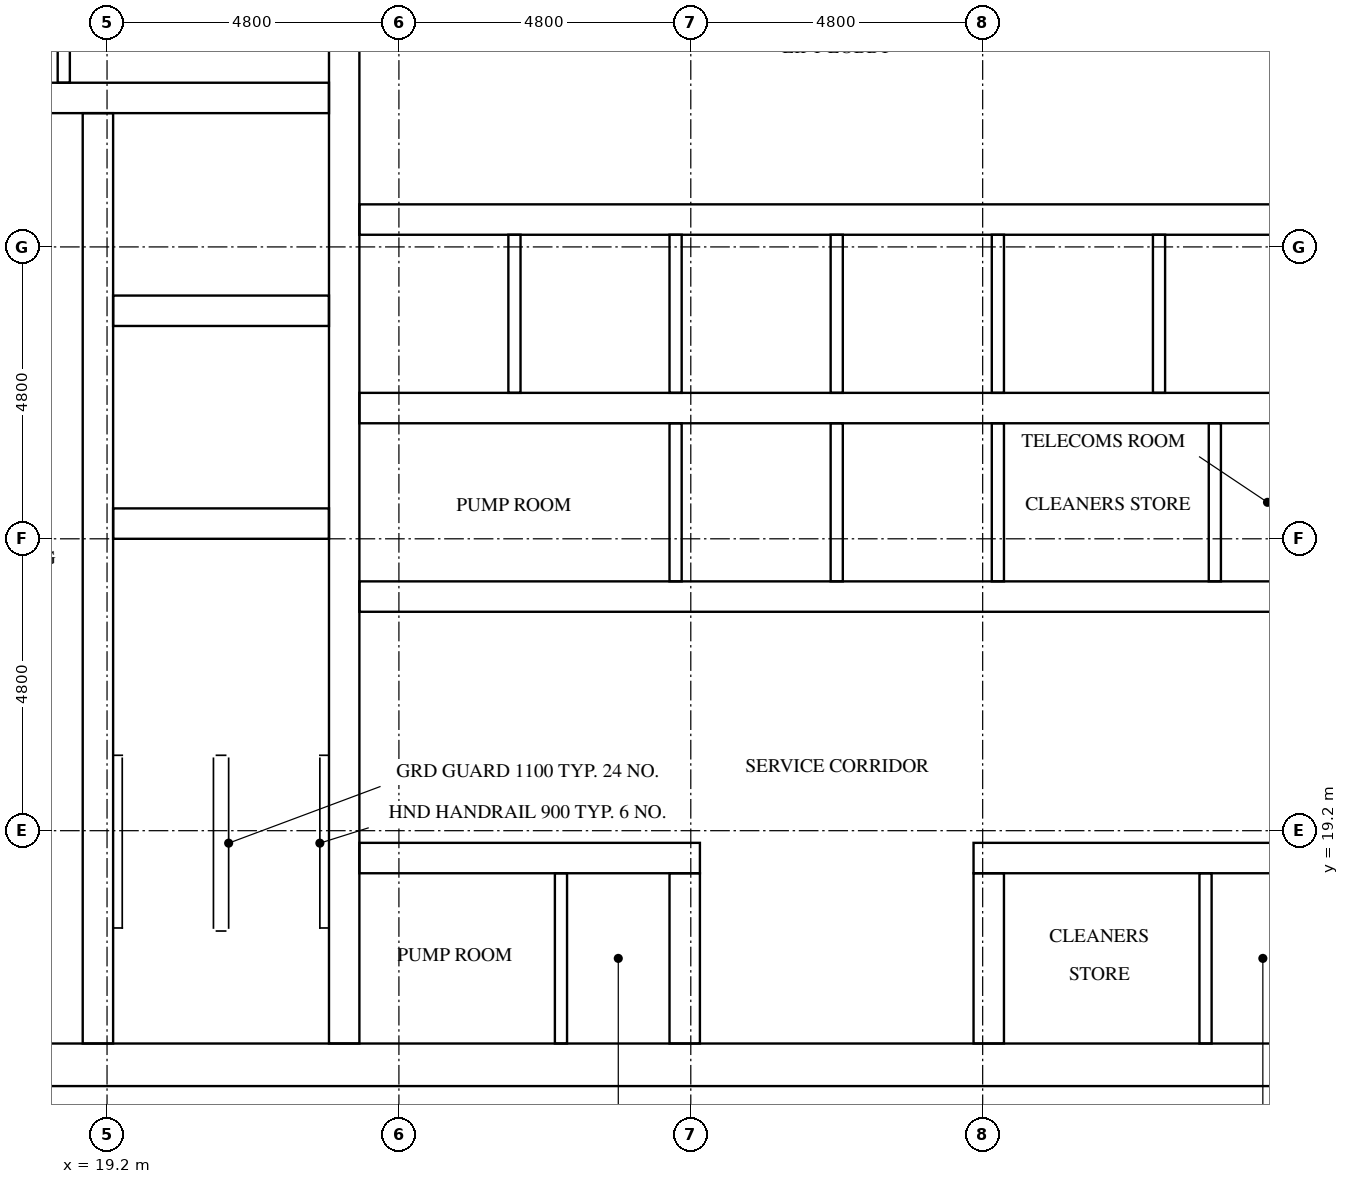
"""IFC4 building model, lengths in metres.
Left out: names, types, materials, properties, quantities, classifications, styles, units other than length and angle.
Written with IfcOpenShell. Run it as: python <this file> out.ifc"""

import sys

from ifc_helpers import new_model, si_unit, direction, frame, frame_2d, origin, place, context, subcontext, project, spatial, rectangle, extrude, element, fill, save


model = new_model("IFC4")
c1 = context("Model", 3, precision=1e-05, world=origin(), true_north=direction((0.0, 1.0)))
c2 = subcontext(c1, "Body", "Model", "MODEL_VIEW")
j1 = project(units=[si_unit("LENGTHUNIT", "METRE"), si_unit("PLANEANGLEUNIT", "RADIAN")], contexts=[c1])
p1 = place(None, origin())
s1 = spatial("IfcSite", under=j1, at=p1, CompositionType="ELEMENT")
p2 = place(p1, origin())
s2 = spatial("IfcBuilding", under=s1, at=p2, CompositionType="ELEMENT")
p3 = place(p2, frame((0.0, 0.0, 226.3)))
s3 = spatial("IfcBuildingStorey", under=s2, at=p3, CompositionType="ELEMENT", Elevation=226.3)
p4 = place(p3, frame((15.0, 15.35, 0.0), z_axis=(0.0, 0.0, 1.0), x_axis=(1.0, 0.0, 0.0)))
e1 = element("IfcWall", 1, at=p4, inside=s3, PredefinedType="SHEAR", context=c2, shape_type="SweptSolid", body=[
    extrude(rectangle(XDim=32.4, YDim=0.7, at=frame_2d((16.2, 0.0))), origin(), (0.0, 0.0, 1.0), 3.2),
])
p5 = place(p4, frame((15.3, 0.0, 0.0)))
e2 = element("IfcOpeningElement", 2, at=p5, cuts=e1, PredefinedType="OPENING", context=c2, shape_type="SweptSolid", body=[
    extrude(rectangle(XDim=1.8, YDim=2.1, at=frame_2d((0.9, 1.05))), frame((0.0, 0.36, 0.0), z_axis=(0.0, -1.0, 0.0), x_axis=(1.0, 0.0, 0.0)), (0.0, 0.0, 1.0), 0.72),
])
p6 = place(p3, frame((19.05, 15.7, 0.0), z_axis=(0.0, 0.0, 1.0), x_axis=(0.0, 1.0, 0.0)))
e3 = element("IfcWall", 3, at=p6, inside=s3, PredefinedType="SHEAR", context=c2, shape_type="SweptSolid", body=[
    extrude(rectangle(XDim=15.3, YDim=0.5, at=frame_2d((7.65, 0.0))), origin(), (0.0, 0.0, 1.0), 3.2),
])
p7 = place(p6, frame((9.75, 0.0, 0.0)))
e4 = element("IfcOpeningElement", 4, at=p7, cuts=e3, PredefinedType="OPENING", context=c2, shape_type="SweptSolid", body=[
    extrude(rectangle(XDim=1.1, YDim=2.1, at=frame_2d((0.55, 1.05))), frame((0.0, 0.26, 0.0), z_axis=(0.0, -1.0, 0.0), x_axis=(1.0, 0.0, 0.0)), (0.0, 0.0, 1.0), 0.52),
])
p8 = place(p6, frame((13.25, 0.0, 0.0)))
e5 = element("IfcOpeningElement", 5, at=p8, cuts=e3, PredefinedType="OPENING", context=c2, shape_type="SweptSolid", body=[
    extrude(rectangle(XDim=1.1, YDim=2.1, at=frame_2d((0.55, 1.05))), frame((0.0, 0.26, 0.0), z_axis=(0.0, -1.0, 0.0), x_axis=(1.0, 0.0, 0.0)), (0.0, 0.0, 1.0), 0.52),
])
p9 = place(p6, frame((0.5, 0.0, 0.0)))
e6 = element("IfcOpeningElement", 6, at=p9, cuts=e3, PredefinedType="OPENING", context=c2, shape_type="SweptSolid", body=[
    extrude(rectangle(XDim=1.2, YDim=2.1, at=frame_2d((0.6, 1.05))), frame((0.0, 0.26, 0.0), z_axis=(0.0, -1.0, 0.0), x_axis=(1.0, 0.0, 0.0)), (0.0, 0.0, 1.0), 0.52),
])
p10 = place(p3, frame((23.1, 15.7, 0.0), z_axis=(0.0, 0.0, 1.0), x_axis=(0.0, 1.0, 0.0)))
e7 = element("IfcWall", 7, at=p10, inside=s3, PredefinedType="SHEAR", context=c2, shape_type="SweptSolid", body=[
    extrude(rectangle(XDim=21.4, YDim=0.5, at=frame_2d((10.7, 0.0))), origin(), (0.0, 0.0, 1.0), 3.2),
])
for number, where, z_axis, x_axis in (
    (8, (19.3, 24.25, 0.0), (0.0, 0.0, 1.0), (1.0, 0.0, 0.0)),
    (9, (19.3, 27.75, 0.0), (0.0, 0.0, 1.0), (1.0, 0.0, 0.0)),
):
    element("IfcWall", number, at=place(p3, frame(where, z_axis=z_axis, x_axis=x_axis)), inside=s3, PredefinedType="SHEAR", context=c2, shape_type="SweptSolid", body=[
        extrude(rectangle(XDim=3.55, YDim=0.5, at=frame_2d((1.775, 0.0))), origin(), (0.0, 0.0, 1.0), 3.2),
    ])
p11 = place(p3, frame((15.7, 31.25, 0.0), z_axis=(0.0, 0.0, 1.0), x_axis=(1.0, 0.0, 0.0)))
e10 = element("IfcWall", 10, at=p11, inside=s3, PredefinedType="SHEAR", context=c2, shape_type="SweptSolid", body=[
    extrude(rectangle(XDim=7.15, YDim=0.5, at=frame_2d((3.575, 0.0))), origin(), (0.0, 0.0, 1.0), 3.2),
])
p12 = place(p3, frame((23.35, 18.75, 0.0), z_axis=(0.0, 0.0, 1.0), x_axis=(1.0, 0.0, 0.0)))
e11 = element("IfcWall", 11, at=p12, inside=s3, PredefinedType="SHEAR", context=c2, shape_type="SweptSolid", body=[
    extrude(rectangle(XDim=5.6, YDim=0.5, at=frame_2d((2.8, 0.0))), origin(), (0.0, 0.0, 1.0), 3.2),
])
p13 = place(p12, frame((1.107, 0.0, 0.0)))
e12 = element("IfcOpeningElement", 12, at=p13, cuts=e11, PredefinedType="OPENING", context=c2, shape_type="SweptSolid", body=[
    extrude(rectangle(XDim=1.0, YDim=2.1, at=frame_2d((0.5, 1.05))), frame((0.0, 0.26, 0.0), z_axis=(0.0, -1.0, 0.0), x_axis=(1.0, 0.0, 0.0)), (0.0, 0.0, 1.0), 0.52),
])
p14 = place(p12, frame((3.758, 0.0, 0.0)))
e13 = element("IfcOpeningElement", 13, at=p14, cuts=e11, PredefinedType="OPENING", context=c2, shape_type="SweptSolid", body=[
    extrude(rectangle(XDim=1.0, YDim=2.1, at=frame_2d((0.5, 1.05))), frame((0.0, 0.26, 0.0), z_axis=(0.0, -1.0, 0.0), x_axis=(1.0, 0.0, 0.0)), (0.0, 0.0, 1.0), 0.52),
])
p15 = place(p3, frame((33.45, 18.75, 0.0), z_axis=(0.0, 0.0, 1.0), x_axis=(1.0, 0.0, 0.0)))
e14 = element("IfcWall", 14, at=p15, inside=s3, PredefinedType="SHEAR", context=c2, shape_type="SweptSolid", body=[
    extrude(rectangle(XDim=5.6, YDim=0.5, at=frame_2d((2.8, 0.0))), origin(), (0.0, 0.0, 1.0), 3.2),
])
p16 = place(p15, frame((1.607, 0.0, 0.0)))
e15 = element("IfcOpeningElement", 15, at=p16, cuts=e14, PredefinedType="OPENING", context=c2, shape_type="SweptSolid", body=[
    extrude(rectangle(XDim=1.0, YDim=2.1, at=frame_2d((0.5, 1.05))), frame((0.0, 0.26, 0.0), z_axis=(0.0, -1.0, 0.0), x_axis=(1.0, 0.0, 0.0)), (0.0, 0.0, 1.0), 0.52),
])
p17 = place(p15, frame((4.258, 0.0, 0.0)))
e16 = element("IfcOpeningElement", 16, at=p17, cuts=e14, PredefinedType="OPENING", context=c2, shape_type="SweptSolid", body=[
    extrude(rectangle(XDim=1.0, YDim=2.1, at=frame_2d((0.5, 1.05))), frame((0.0, 0.26, 0.0), z_axis=(0.0, -1.0, 0.0), x_axis=(1.0, 0.0, 0.0)), (0.0, 0.0, 1.0), 0.52),
])
p18 = place(p3, frame((23.35, 23.05, 0.0), z_axis=(0.0, 0.0, 1.0), x_axis=(1.0, 0.0, 0.0)))
e17 = element("IfcWall", 17, at=p18, inside=s3, PredefinedType="SHEAR", context=c2, shape_type="SweptSolid", body=[
    extrude(rectangle(XDim=15.7, YDim=0.5, at=frame_2d((7.85, 0.0))), origin(), (0.0, 0.0, 1.0), 3.2),
])
p19 = place(p18, frame((2.05, 0.0, 0.0)))
e18 = element("IfcOpeningElement", 18, at=p19, cuts=e17, PredefinedType="OPENING", context=c2, shape_type="SweptSolid", body=[
    extrude(rectangle(XDim=1.0, YDim=2.1, at=frame_2d((0.5, 1.05))), frame((0.0, 0.26, 0.0), z_axis=(0.0, -1.0, 0.0), x_axis=(1.0, 0.0, 0.0)), (0.0, 0.0, 1.0), 0.52),
])
p20 = place(p18, frame((11.784, 0.0, 0.0)))
e19 = element("IfcOpeningElement", 19, at=p20, cuts=e17, PredefinedType="OPENING", context=c2, shape_type="SweptSolid", body=[
    extrude(rectangle(XDim=1.0, YDim=2.1, at=frame_2d((0.5, 1.05))), frame((0.0, 0.26, 0.0), z_axis=(0.0, -1.0, 0.0), x_axis=(1.0, 0.0, 0.0)), (0.0, 0.0, 1.0), 0.52),
])
p21 = place(p18, frame((14.434, 0.0, 0.0)))
e20 = element("IfcOpeningElement", 20, at=p21, cuts=e17, PredefinedType="OPENING", context=c2, shape_type="SweptSolid", body=[
    extrude(rectangle(XDim=1.0, YDim=2.1, at=frame_2d((0.5, 1.05))), frame((0.0, 0.26, 0.0), z_axis=(0.0, -1.0, 0.0), x_axis=(1.0, 0.0, 0.0)), (0.0, 0.0, 1.0), 0.52),
])
p22 = place(p3, frame((23.35, 26.15, 0.0), z_axis=(0.0, 0.0, 1.0), x_axis=(1.0, 0.0, 0.0)))
e21 = element("IfcWall", 21, at=p22, inside=s3, PredefinedType="SHEAR", context=c2, shape_type="SweptSolid", body=[
    extrude(rectangle(XDim=15.7, YDim=0.5, at=frame_2d((7.85, 0.0))), origin(), (0.0, 0.0, 1.0), 3.2),
])
p23 = place(p3, frame((23.35, 29.25, 0.0), z_axis=(0.0, 0.0, 1.0), x_axis=(1.0, 0.0, 0.0)))
e22 = element("IfcWall", 22, at=p23, inside=s3, PredefinedType="SHEAR", context=c2, shape_type="SweptSolid", body=[
    extrude(rectangle(XDim=15.7, YDim=0.5, at=frame_2d((7.85, 0.0))), origin(), (0.0, 0.0, 1.0), 3.2),
])
p24 = place(p23, frame((0.675, 0.0, 0.0)))
e23 = element("IfcOpeningElement", 23, at=p24, cuts=e22, PredefinedType="OPENING", context=c2, shape_type="SweptSolid", body=[
    extrude(rectangle(XDim=1.1, YDim=2.1, at=frame_2d((0.55, 1.05))), frame((0.0, 0.26, 0.0), z_axis=(0.0, -1.0, 0.0), x_axis=(1.0, 0.0, 0.0)), (0.0, 0.0, 1.0), 0.52),
])
p25 = place(p23, frame((3.325, 0.0, 0.0)))
e24 = element("IfcOpeningElement", 24, at=p25, cuts=e22, PredefinedType="OPENING", context=c2, shape_type="SweptSolid", body=[
    extrude(rectangle(XDim=1.1, YDim=2.1, at=frame_2d((0.55, 1.05))), frame((0.0, 0.26, 0.0), z_axis=(0.0, -1.0, 0.0), x_axis=(1.0, 0.0, 0.0)), (0.0, 0.0, 1.0), 0.52),
])
p26 = place(p23, frame((5.975, 0.0, 0.0)))
e25 = element("IfcOpeningElement", 25, at=p26, cuts=e22, PredefinedType="OPENING", context=c2, shape_type="SweptSolid", body=[
    extrude(rectangle(XDim=1.1, YDim=2.1, at=frame_2d((0.55, 1.05))), frame((0.0, 0.26, 0.0), z_axis=(0.0, -1.0, 0.0), x_axis=(1.0, 0.0, 0.0)), (0.0, 0.0, 1.0), 0.52),
])
p27 = place(p23, frame((8.625, 0.0, 0.0)))
e26 = element("IfcOpeningElement", 26, at=p27, cuts=e22, PredefinedType="OPENING", context=c2, shape_type="SweptSolid", body=[
    extrude(rectangle(XDim=1.1, YDim=2.1, at=frame_2d((0.55, 1.05))), frame((0.0, 0.26, 0.0), z_axis=(0.0, -1.0, 0.0), x_axis=(1.0, 0.0, 0.0)), (0.0, 0.0, 1.0), 0.52),
])
p28 = place(p23, frame((11.275, 0.0, 0.0)))
e27 = element("IfcOpeningElement", 27, at=p28, cuts=e22, PredefinedType="OPENING", context=c2, shape_type="SweptSolid", body=[
    extrude(rectangle(XDim=1.1, YDim=2.1, at=frame_2d((0.55, 1.05))), frame((0.0, 0.26, 0.0), z_axis=(0.0, -1.0, 0.0), x_axis=(1.0, 0.0, 0.0)), (0.0, 0.0, 1.0), 0.52),
])
p29 = place(p23, frame((13.925, 0.0, 0.0)))
e28 = element("IfcOpeningElement", 28, at=p29, cuts=e22, PredefinedType="OPENING", context=c2, shape_type="SweptSolid", body=[
    extrude(rectangle(XDim=1.1, YDim=2.1, at=frame_2d((0.55, 1.05))), frame((0.0, 0.26, 0.0), z_axis=(0.0, -1.0, 0.0), x_axis=(1.0, 0.0, 0.0)), (0.0, 0.0, 1.0), 0.52),
])
for number, where, z_axis, x_axis in (
    (29, (28.7, 15.7, 0.0), (0.0, 0.0, 1.0), (0.0, 1.0, 0.0)),
    (30, (33.7, 15.7, 0.0), (0.0, 0.0, 1.0), (0.0, 1.0, 0.0)),
):
    element("IfcWall", number, at=place(p3, frame(where, z_axis=z_axis, x_axis=x_axis)), inside=s3, PredefinedType="SHEAR", context=c2, shape_type="SweptSolid", body=[
        extrude(rectangle(XDim=2.8, YDim=0.5, at=frame_2d((1.4, 0.0))), origin(), (0.0, 0.0, 1.0), 3.2),
    ])
p30 = place(p3, frame((25.9, 26.4, 0.0), z_axis=(0.0, 0.0, 1.0), x_axis=(0.0, 1.0, 0.0)))
e31 = element("IfcWall", 31, at=p30, inside=s3, PredefinedType="SOLIDWALL", context=c2, shape_type="SweptSolid", body=[
    extrude(rectangle(XDim=2.6, YDim=0.2, at=frame_2d((1.3, 0.0))), origin(), (0.0, 0.0, 1.0), 3.2),
])
p31 = place(p3, frame((28.55, 23.3, 0.0), z_axis=(0.0, 0.0, 1.0), x_axis=(0.0, 1.0, 0.0)))
e32 = element("IfcWall", 32, at=p31, inside=s3, PredefinedType="SOLIDWALL", context=c2, shape_type="SweptSolid", body=[
    extrude(rectangle(XDim=2.6, YDim=0.2, at=frame_2d((1.3, 0.0))), origin(), (0.0, 0.0, 1.0), 3.2),
])
p32 = place(p3, frame((28.55, 26.4, 0.0), z_axis=(0.0, 0.0, 1.0), x_axis=(0.0, 1.0, 0.0)))
e33 = element("IfcWall", 33, at=p32, inside=s3, PredefinedType="SOLIDWALL", context=c2, shape_type="SweptSolid", body=[
    extrude(rectangle(XDim=2.6, YDim=0.2, at=frame_2d((1.3, 0.0))), origin(), (0.0, 0.0, 1.0), 3.2),
])
p33 = place(p3, frame((31.2, 23.3, 0.0), z_axis=(0.0, 0.0, 1.0), x_axis=(0.0, 1.0, 0.0)))
e34 = element("IfcWall", 34, at=p33, inside=s3, PredefinedType="SOLIDWALL", context=c2, shape_type="SweptSolid", body=[
    extrude(rectangle(XDim=2.6, YDim=0.2, at=frame_2d((1.3, 0.0))), origin(), (0.0, 0.0, 1.0), 3.2),
])
p34 = place(p3, frame((31.2, 26.4, 0.0), z_axis=(0.0, 0.0, 1.0), x_axis=(0.0, 1.0, 0.0)))
e35 = element("IfcWall", 35, at=p34, inside=s3, PredefinedType="SOLIDWALL", context=c2, shape_type="SweptSolid", body=[
    extrude(rectangle(XDim=2.6, YDim=0.2, at=frame_2d((1.3, 0.0))), origin(), (0.0, 0.0, 1.0), 3.2),
])
p35 = place(p3, frame((33.85, 23.3, 0.0), z_axis=(0.0, 0.0, 1.0), x_axis=(0.0, 1.0, 0.0)))
e36 = element("IfcWall", 36, at=p35, inside=s3, PredefinedType="SOLIDWALL", context=c2, shape_type="SweptSolid", body=[
    extrude(rectangle(XDim=2.6, YDim=0.2, at=frame_2d((1.3, 0.0))), origin(), (0.0, 0.0, 1.0), 3.2),
])
for number, where, z_axis, x_axis in (
    (37, (33.85, 26.4, 0.0), (0.0, 0.0, 1.0), (0.0, 1.0, 0.0)),
    (38, (36.5, 26.4, 0.0), (0.0, 0.0, 1.0), (0.0, 1.0, 0.0)),
):
    element("IfcWall", number, at=place(p3, frame(where, z_axis=z_axis, x_axis=x_axis)), inside=s3, PredefinedType="SOLIDWALL", context=c2, shape_type="SweptSolid", body=[
        extrude(rectangle(XDim=2.6, YDim=0.2, at=frame_2d((1.3, 0.0))), origin(), (0.0, 0.0, 1.0), 3.2),
    ])
p36 = place(p3, frame((18.489, 31.5, 0.0), z_axis=(0.0, 0.0, 1.0), x_axis=(0.0, 1.0, 0.0)))
e39 = element("IfcWall", 39, at=p36, inside=s3, PredefinedType="PARTITIONING", context=c2, shape_type="SweptSolid", body=[
    extrude(rectangle(XDim=5.6, YDim=0.2, at=frame_2d((2.8, 0.0))), origin(), (0.0, 0.0, 1.0), 3.2),
])
p37 = place(p3, frame((37.418, 23.3, 0.0), z_axis=(0.0, 0.0, 1.0), x_axis=(0.0, 1.0, 0.0)))
e40 = element("IfcWall", 40, at=p37, inside=s3, PredefinedType="PARTITIONING", context=c2, shape_type="SweptSolid", body=[
    extrude(rectangle(XDim=2.6, YDim=0.2, at=frame_2d((1.3, 0.0))), origin(), (0.0, 0.0, 1.0), 3.2),
])
for number, where, z_axis, x_axis in (
    (41, (26.665, 15.7, 0.0), (0.0, 0.0, 1.0), (0.0, 1.0, 0.0)),
    (42, (37.265, 15.7, 0.0), (0.0, 0.0, 1.0), (0.0, 1.0, 0.0)),
):
    element("IfcWall", number, at=place(p3, frame(where, z_axis=z_axis, x_axis=x_axis)), inside=s3, PredefinedType="PARTITIONING", context=c2, shape_type="SweptSolid", body=[
        extrude(rectangle(XDim=2.8, YDim=0.2, at=frame_2d((1.4, 0.0))), origin(), (0.0, 0.0, 1.0), 3.2),
    ])
p38 = place(p24, origin())
e43 = element("IfcDoor", 43, at=p38, inside=s3, OperationType="DOUBLE_DOOR_SLIDING", PredefinedType="DOOR", context=c2, shape_type="SweptSolid", body=[
    extrude(rectangle(XDim=1.1, YDim=2.1, at=frame_2d((0.55, 1.05))), frame((0.0, 0.025, 0.0), z_axis=(0.0, -1.0, 0.0), x_axis=(1.0, 0.0, 0.0)), (0.0, 0.0, 1.0), 0.05),
])
fill(e23, e43)
p39 = place(p25, origin())
e44 = element("IfcDoor", 44, at=p39, inside=s3, OperationType="DOUBLE_DOOR_SLIDING", PredefinedType="DOOR", context=c2, shape_type="SweptSolid", body=[
    extrude(rectangle(XDim=1.1, YDim=2.1, at=frame_2d((0.55, 1.05))), frame((0.0, 0.025, 0.0), z_axis=(0.0, -1.0, 0.0), x_axis=(1.0, 0.0, 0.0)), (0.0, 0.0, 1.0), 0.05),
])
fill(e24, e44)
p40 = place(p26, origin())
e45 = element("IfcDoor", 45, at=p40, inside=s3, OperationType="DOUBLE_DOOR_SLIDING", PredefinedType="DOOR", context=c2, shape_type="SweptSolid", body=[
    extrude(rectangle(XDim=1.1, YDim=2.1, at=frame_2d((0.55, 1.05))), frame((0.0, 0.025, 0.0), z_axis=(0.0, -1.0, 0.0), x_axis=(1.0, 0.0, 0.0)), (0.0, 0.0, 1.0), 0.05),
])
fill(e25, e45)
p41 = place(p27, origin())
e46 = element("IfcDoor", 46, at=p41, inside=s3, OperationType="DOUBLE_DOOR_SLIDING", PredefinedType="DOOR", context=c2, shape_type="SweptSolid", body=[
    extrude(rectangle(XDim=1.1, YDim=2.1, at=frame_2d((0.55, 1.05))), frame((0.0, 0.025, 0.0), z_axis=(0.0, -1.0, 0.0), x_axis=(1.0, 0.0, 0.0)), (0.0, 0.0, 1.0), 0.05),
])
fill(e26, e46)
p42 = place(p28, origin())
e47 = element("IfcDoor", 47, at=p42, inside=s3, OperationType="DOUBLE_DOOR_SLIDING", PredefinedType="DOOR", context=c2, shape_type="SweptSolid", body=[
    extrude(rectangle(XDim=1.1, YDim=2.1, at=frame_2d((0.55, 1.05))), frame((0.0, 0.025, 0.0), z_axis=(0.0, -1.0, 0.0), x_axis=(1.0, 0.0, 0.0)), (0.0, 0.0, 1.0), 0.05),
])
fill(e27, e47)
p43 = place(p29, origin())
e48 = element("IfcDoor", 48, at=p43, inside=s3, OperationType="DOUBLE_DOOR_SLIDING", PredefinedType="DOOR", context=c2, shape_type="SweptSolid", body=[
    extrude(rectangle(XDim=1.1, YDim=2.1, at=frame_2d((0.55, 1.05))), frame((0.0, 0.025, 0.0), z_axis=(0.0, -1.0, 0.0), x_axis=(1.0, 0.0, 0.0)), (0.0, 0.0, 1.0), 0.05),
])
fill(e28, e48)
p44 = place(p7, origin())
e49 = element("IfcDoor", 49, at=p44, inside=s3, OperationType="DOUBLE_DOOR_SLIDING", PredefinedType="DOOR", context=c2, shape_type="SweptSolid", body=[
    extrude(rectangle(XDim=1.1, YDim=2.1, at=frame_2d((0.55, 1.05))), frame((0.0, 0.025, 0.0), z_axis=(0.0, -1.0, 0.0), x_axis=(1.0, 0.0, 0.0)), (0.0, 0.0, 1.0), 0.05),
])
fill(e4, e49)
p45 = place(p8, origin())
e50 = element("IfcDoor", 50, at=p45, inside=s3, OperationType="DOUBLE_DOOR_SLIDING", PredefinedType="DOOR", context=c2, shape_type="SweptSolid", body=[
    extrude(rectangle(XDim=1.1, YDim=2.1, at=frame_2d((0.55, 1.05))), frame((0.0, 0.025, 0.0), z_axis=(0.0, -1.0, 0.0), x_axis=(1.0, 0.0, 0.0)), (0.0, 0.0, 1.0), 0.05),
])
fill(e5, e50)
p46 = place(p9, frame((1.2, 0.0, 0.0), z_axis=(0.0, 0.0, 1.0), x_axis=(-1.0, 0.0, 0.0)))
e51 = element("IfcDoor", 51, at=p46, inside=s3, OperationType="SINGLE_SWING_LEFT", PredefinedType="DOOR", context=c2, shape_type="SweptSolid", body=[
    extrude(rectangle(XDim=1.2, YDim=2.1, at=frame_2d((0.6, 1.05))), frame((0.0, 0.025, 0.0), z_axis=(0.0, -1.0, 0.0), x_axis=(1.0, 0.0, 0.0)), (0.0, 0.0, 1.0), 0.05),
])
fill(e6, e51)
p47 = place(p5, frame((1.8, 0.0, 0.0), z_axis=(0.0, 0.0, 1.0), x_axis=(-1.0, 0.0, 0.0)))
e52 = element("IfcDoor", 52, at=p47, inside=s3, OperationType="DOUBLE_DOOR_SINGLE_SWING", PredefinedType="DOOR", context=c2, shape_type="SweptSolid", body=[
    extrude(rectangle(XDim=1.8, YDim=2.1, at=frame_2d((0.9, 1.05))), frame((0.0, 0.025, 0.0), z_axis=(0.0, -1.0, 0.0), x_axis=(1.0, 0.0, 0.0)), (0.0, 0.0, 1.0), 0.05),
])
fill(e2, e52)
p48 = place(p19, frame((1.0, 0.0, 0.0), z_axis=(0.0, 0.0, 1.0), x_axis=(-1.0, 0.0, 0.0)))
e53 = element("IfcDoor", 53, at=p48, inside=s3, OperationType="SINGLE_SWING_RIGHT", PredefinedType="DOOR", context=c2, shape_type="SweptSolid", body=[
    extrude(rectangle(XDim=1.0, YDim=2.1, at=frame_2d((0.5, 1.05))), frame((0.0, 0.025, 0.0), z_axis=(0.0, -1.0, 0.0), x_axis=(1.0, 0.0, 0.0)), (0.0, 0.0, 1.0), 0.05),
])
fill(e18, e53)
p49 = place(p20, frame((1.0, 0.0, 0.0), z_axis=(0.0, 0.0, 1.0), x_axis=(-1.0, 0.0, 0.0)))
e54 = element("IfcDoor", 54, at=p49, inside=s3, OperationType="SINGLE_SWING_LEFT", PredefinedType="DOOR", context=c2, shape_type="SweptSolid", body=[
    extrude(rectangle(XDim=1.0, YDim=2.1, at=frame_2d((0.5, 1.05))), frame((0.0, 0.025, 0.0), z_axis=(0.0, -1.0, 0.0), x_axis=(1.0, 0.0, 0.0)), (0.0, 0.0, 1.0), 0.05),
])
fill(e19, e54)
p50 = place(p21, frame((1.0, 0.0, 0.0), z_axis=(0.0, 0.0, 1.0), x_axis=(-1.0, 0.0, 0.0)))
e55 = element("IfcDoor", 55, at=p50, inside=s3, OperationType="SINGLE_SWING_RIGHT", PredefinedType="DOOR", context=c2, shape_type="SweptSolid", body=[
    extrude(rectangle(XDim=1.0, YDim=2.1, at=frame_2d((0.5, 1.05))), frame((0.0, 0.025, 0.0), z_axis=(0.0, -1.0, 0.0), x_axis=(1.0, 0.0, 0.0)), (0.0, 0.0, 1.0), 0.05),
])
fill(e20, e55)
p51 = place(p13, origin())
e56 = element("IfcDoor", 56, at=p51, inside=s3, OperationType="SINGLE_SWING_LEFT", PredefinedType="DOOR", context=c2, shape_type="SweptSolid", body=[
    extrude(rectangle(XDim=1.0, YDim=2.1, at=frame_2d((0.5, 1.05))), frame((0.0, 0.025, 0.0), z_axis=(0.0, -1.0, 0.0), x_axis=(1.0, 0.0, 0.0)), (0.0, 0.0, 1.0), 0.05),
])
fill(e12, e56)
p52 = place(p14, origin())
e57 = element("IfcDoor", 57, at=p52, inside=s3, OperationType="SINGLE_SWING_RIGHT", PredefinedType="DOOR", context=c2, shape_type="SweptSolid", body=[
    extrude(rectangle(XDim=1.0, YDim=2.1, at=frame_2d((0.5, 1.05))), frame((0.0, 0.025, 0.0), z_axis=(0.0, -1.0, 0.0), x_axis=(1.0, 0.0, 0.0)), (0.0, 0.0, 1.0), 0.05),
])
fill(e13, e57)
p53 = place(p16, origin())
e58 = element("IfcDoor", 58, at=p53, inside=s3, OperationType="SINGLE_SWING_LEFT", PredefinedType="DOOR", context=c2, shape_type="SweptSolid", body=[
    extrude(rectangle(XDim=1.0, YDim=2.1, at=frame_2d((0.5, 1.05))), frame((0.0, 0.025, 0.0), z_axis=(0.0, -1.0, 0.0), x_axis=(1.0, 0.0, 0.0)), (0.0, 0.0, 1.0), 0.05),
])
fill(e15, e58)
p54 = place(p17, origin())
e59 = element("IfcDoor", 59, at=p54, inside=s3, OperationType="SINGLE_SWING_RIGHT", PredefinedType="DOOR", context=c2, shape_type="SweptSolid", body=[
    extrude(rectangle(XDim=1.0, YDim=2.1, at=frame_2d((0.5, 1.05))), frame((0.0, 0.025, 0.0), z_axis=(0.0, -1.0, 0.0), x_axis=(1.0, 0.0, 0.0)), (0.0, 0.0, 1.0), 0.05),
])
fill(e16, e59)
save(model, sys.argv[1])
